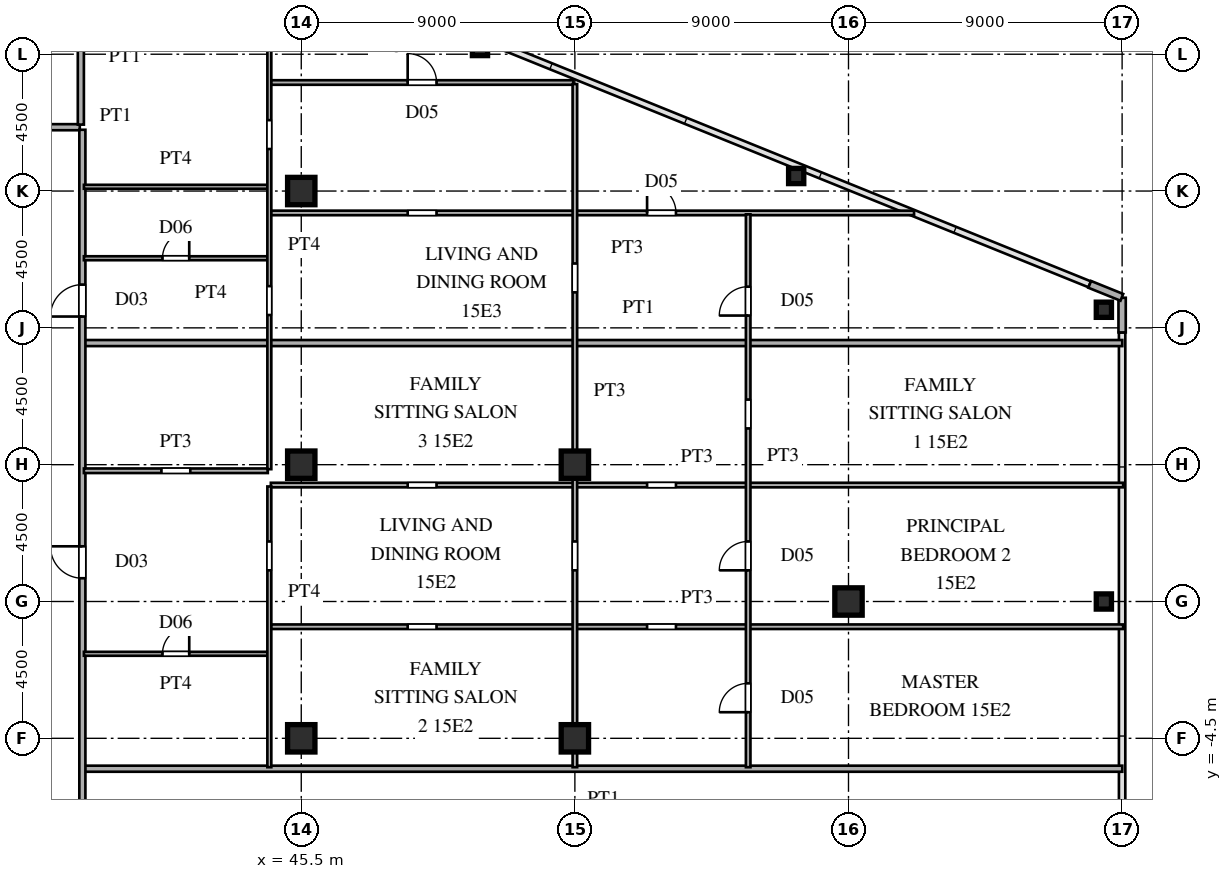
"""IFC4 building model, lengths in metres.
Left out: names, types, materials, properties, quantities, classifications, styles, units other than length and angle.
Written with IfcOpenShell. Run it as: python <this file> out.ifc"""

import sys

from ifc_helpers import new_model, si_unit, direction, frame, frame_2d, origin, origin_2d, place, context, subcontext, project, spatial, rectangle, hollow_rectangle, i_section, extrude, source, transform, mapped, element, fill, save


model = new_model("IFC4")
c1 = context("Model", 3, precision=1e-05, world=origin(), true_north=direction((0.0, 1.0)))
c2 = subcontext(c1, "Body", "Model", "MODEL_VIEW")
j1 = project(units=[si_unit("LENGTHUNIT", "METRE"), si_unit("PLANEANGLEUNIT", "RADIAN")], contexts=[c1])
p1 = place(None, origin())
s1 = spatial("IfcSite", under=j1, at=p1, CompositionType="ELEMENT")
p2 = place(p1, origin())
s2 = spatial("IfcBuilding", under=s1, at=p2, CompositionType="ELEMENT")
p3 = place(p2, frame((0.0, 0.0, 58.5)))
s3 = spatial("IfcBuildingStorey", under=s2, at=p3, CompositionType="ELEMENT", Elevation=58.5)
m1 = source(origin(), c2, "Body", "SweptSolid", [
    extrude(i_section(OverallWidth=0.9, OverallDepth=0.9, WebThickness=0.036, FlangeThickness=0.055, at=origin_2d()), origin(), (0.0, 0.0, 1.0), 3.6),
])
for number, where, z_axis, x_axis in (
    (1, (45.5, -4.5, 0.0), (0.0, 0.0, 1.0), (1.0, 0.0, 0.0)),
    (2, (45.5, 4.5, 0.0), (0.0, 0.0, 1.0), (1.0, 0.0, 0.0)),
    (3, (45.5, 13.5, 0.0), (0.0, 0.0, 1.0), (1.0, 0.0, 0.0)),
    (4, (54.5, -4.5, 0.0), (0.0, 0.0, 1.0), (1.0, 0.0, 0.0)),
    (5, (54.5, 4.5, 0.0), (0.0, 0.0, 1.0), (1.0, 0.0, 0.0)),
    (6, (63.5, 0.0, 0.0), (0.0, 0.0, 1.0), (1.0, 0.0, 0.0)),
):
    element("IfcColumn", number, at=place(p3, frame(where, z_axis=z_axis, x_axis=x_axis)), inside=s3, PredefinedType="COLUMN", context=c2, shape_type="MappedRepresentation", body=[
        mapped(m1, transform((0.0, 0.0, 0.0), scale=1.0)),
    ])
m2 = source(origin(), c2, "Body", "SweptSolid", [
    extrude(hollow_rectangle(XDim=0.5, YDim=0.5, WallThickness=0.02, at=origin_2d()), origin(), (0.0, 0.0, 1.0), 3.6),
])
for number, where, z_axis, x_axis in (
    (7, (71.9, 9.596, 0.0), (0.0, 0.0, 1.0), (1.0, 0.0, 0.0)),
    (8, (51.378, 18.204, 0.0), (0.0, 0.0, 1.0), (1.0, 0.0, 0.0)),
    (9, (61.779, 13.994, 0.0), (0.0, 0.0, 1.0), (1.0, 0.0, 0.0)),
    (10, (71.9, 0.0, 0.0), (0.0, 0.0, 1.0), (1.0, 0.0, 0.0)),
):
    element("IfcColumn", number, at=place(p3, frame(where, z_axis=z_axis, x_axis=x_axis)), inside=s3, PredefinedType="COLUMN", context=c2, shape_type="MappedRepresentation", body=[
        mapped(m2, transform((0.0, 0.0, 0.0), scale=1.0)),
    ])
for number, where, z_axis, x_axis in (
    (11, (72.5, 8.85, 0.0), (0.0, 0.0, 1.0), (0.0, 1.0, 0.0)),
    (12, (72.491, 10.004, 0.0), (0.0, 0.0, 1.0), (-0.927, 0.375, 0.0)),
):
    element("IfcWall", number, at=place(p3, frame(where, z_axis=z_axis, x_axis=x_axis)), inside=s3, PredefinedType="SOLIDWALL", context=c2, shape_type="SweptSolid", body=[
        extrude(rectangle(XDim=1.14, YDim=0.24, at=frame_2d((0.57, 0.0))), origin(), (0.0, 0.0, 1.0), 3.38),
    ])
p4 = place(p3, frame((38.38, -5.5, 0.0), z_axis=(0.0, 0.0, 1.0), x_axis=(1.0, 0.0, 0.0)))
e13 = element("IfcWall", 13, at=p4, inside=s3, PredefinedType="PARTITIONING", context=c2, shape_type="SweptSolid", body=[
    extrude(rectangle(XDim=34.125, YDim=0.2, at=frame_2d((17.062, 0.0))), origin(), (0.0, 0.0, 1.0), 3.38),
])
p5 = place(p3, frame((38.35, -1.72, 0.0), z_axis=(0.0, 0.0, 1.0), x_axis=(1.0, 0.0, 0.0)))
e14 = element("IfcWall", 14, at=p5, inside=s3, PredefinedType="PARTITIONING", context=c2, shape_type="SweptSolid", body=[
    extrude(rectangle(XDim=6.05, YDim=0.13, at=frame_2d((3.025, 0.0))), origin(), (0.0, 0.0, 1.0), 3.38),
])
p6 = place(p5, frame((2.585, 0.0, 0.0)))
e15 = element("IfcOpeningElement", 15, at=p6, cuts=e14, PredefinedType="OPENING", context=c2, shape_type="SweptSolid", body=[
    extrude(rectangle(XDim=0.88, YDim=2.1, at=frame_2d((0.44, 1.05))), frame((0.0, 0.075, 0.0), z_axis=(0.0, -1.0, 0.0), x_axis=(1.0, 0.0, 0.0)), (0.0, 0.0, 1.0), 0.15),
])
p7 = place(p3, frame((44.5, -0.83, 0.0), z_axis=(0.0, 0.0, 1.0), x_axis=(1.0, 0.0, 0.0)))
e16 = element("IfcWall", 16, at=p7, inside=s3, PredefinedType="PARTITIONING", context=c2, shape_type="SweptSolid", body=[
    extrude(rectangle(XDim=28.035, YDim=0.15, at=frame_2d((14.018, 0.0))), origin(), (0.0, 0.0, 1.0), 3.38),
])
p8 = place(p7, frame((4.5, 0.0, 0.0)))
e17 = element("IfcOpeningElement", 17, at=p8, cuts=e16, PredefinedType="OPENING", context=c2, shape_type="SweptSolid", body=[
    extrude(rectangle(XDim=0.95, YDim=2.15, at=frame_2d((0.475, 1.075))), frame((0.0, 0.085, 0.0), z_axis=(0.0, -1.0, 0.0), x_axis=(1.0, 0.0, 0.0)), (0.0, 0.0, 1.0), 0.17),
])
p9 = place(p7, frame((12.375, 0.0, 0.0)))
e18 = element("IfcOpeningElement", 18, at=p9, cuts=e16, PredefinedType="OPENING", context=c2, shape_type="SweptSolid", body=[
    extrude(rectangle(XDim=0.95, YDim=2.15, at=frame_2d((0.475, 1.075))), frame((0.0, 0.085, 0.0), z_axis=(0.0, -1.0, 0.0), x_axis=(1.0, 0.0, 0.0)), (0.0, 0.0, 1.0), 0.17),
])
p10 = place(p3, frame((44.5, 3.83, 0.0), z_axis=(0.0, 0.0, 1.0), x_axis=(1.0, 0.0, 0.0)))
e19 = element("IfcWall", 19, at=p10, inside=s3, PredefinedType="PARTITIONING", context=c2, shape_type="SweptSolid", body=[
    extrude(rectangle(XDim=28.035, YDim=0.15, at=frame_2d((14.018, 0.0))), origin(), (0.0, 0.0, 1.0), 3.38),
])
p11 = place(p10, frame((4.5, 0.0, 0.0)))
e20 = element("IfcOpeningElement", 20, at=p11, cuts=e19, PredefinedType="OPENING", context=c2, shape_type="SweptSolid", body=[
    extrude(rectangle(XDim=0.95, YDim=2.15, at=frame_2d((0.475, 1.075))), frame((0.0, 0.085, 0.0), z_axis=(0.0, -1.0, 0.0), x_axis=(1.0, 0.0, 0.0)), (0.0, 0.0, 1.0), 0.17),
])
p12 = place(p10, frame((12.375, 0.0, 0.0)))
e21 = element("IfcOpeningElement", 21, at=p12, cuts=e19, PredefinedType="OPENING", context=c2, shape_type="SweptSolid", body=[
    extrude(rectangle(XDim=0.95, YDim=2.15, at=frame_2d((0.475, 1.075))), frame((0.0, 0.085, 0.0), z_axis=(0.0, -1.0, 0.0), x_axis=(1.0, 0.0, 0.0)), (0.0, 0.0, 1.0), 0.17),
])
p13 = place(p3, frame((38.35, 4.3, 0.0), z_axis=(0.0, 0.0, 1.0), x_axis=(1.0, 0.0, 0.0)))
e22 = element("IfcWall", 22, at=p13, inside=s3, PredefinedType="PARTITIONING", context=c2, shape_type="SweptSolid", body=[
    extrude(rectangle(XDim=6.05, YDim=0.15, at=frame_2d((3.025, 0.0))), origin(), (0.0, 0.0, 1.0), 3.38),
])
p14 = place(p13, frame((2.55, 0.0, 0.0)))
e23 = element("IfcOpeningElement", 23, at=p14, cuts=e22, PredefinedType="OPENING", context=c2, shape_type="SweptSolid", body=[
    extrude(rectangle(XDim=0.95, YDim=2.15, at=frame_2d((0.475, 1.075))), frame((0.0, 0.085, 0.0), z_axis=(0.0, -1.0, 0.0), x_axis=(1.0, 0.0, 0.0)), (0.0, 0.0, 1.0), 0.17),
])
p15 = place(p3, frame((38.38, 8.5, 0.0), z_axis=(0.0, 0.0, 1.0), x_axis=(1.0, 0.0, 0.0)))
e24 = element("IfcWall", 24, at=p15, inside=s3, PredefinedType="PARTITIONING", context=c2, shape_type="SweptSolid", body=[
    extrude(rectangle(XDim=34.125, YDim=0.2, at=frame_2d((17.062, 0.0))), origin(), (0.0, 0.0, 1.0), 3.38),
])
p16 = place(p3, frame((38.35, 11.29, 0.0), z_axis=(0.0, 0.0, 1.0), x_axis=(1.0, 0.0, 0.0)))
e25 = element("IfcWall", 25, at=p16, inside=s3, PredefinedType="PARTITIONING", context=c2, shape_type="SweptSolid", body=[
    extrude(rectangle(XDim=6.05, YDim=0.13, at=frame_2d((3.025, 0.0))), origin(), (0.0, 0.0, 1.0), 3.38),
])
p17 = place(p16, frame((2.585, 0.0, 0.0)))
e26 = element("IfcOpeningElement", 26, at=p17, cuts=e25, PredefinedType="OPENING", context=c2, shape_type="SweptSolid", body=[
    extrude(rectangle(XDim=0.88, YDim=2.1, at=frame_2d((0.44, 1.05))), frame((0.0, 0.075, 0.0), z_axis=(0.0, -1.0, 0.0), x_axis=(1.0, 0.0, 0.0)), (0.0, 0.0, 1.0), 0.15),
])
p18 = place(p3, frame((44.5, 12.78, 0.0), z_axis=(0.0, 0.0, 1.0), x_axis=(1.0, 0.0, 0.0)))
e27 = element("IfcWall", 27, at=p18, inside=s3, PredefinedType="PARTITIONING", context=c2, shape_type="SweptSolid", body=[
    extrude(rectangle(XDim=21.156, YDim=0.15, at=frame_2d((10.578, 0.0))), origin(), (0.0, 0.0, 1.0), 3.38),
])
p19 = place(p18, frame((4.5, 0.0, 0.0)))
e28 = element("IfcOpeningElement", 28, at=p19, cuts=e27, PredefinedType="OPENING", context=c2, shape_type="SweptSolid", body=[
    extrude(rectangle(XDim=0.95, YDim=2.15, at=frame_2d((0.475, 1.075))), frame((0.0, 0.085, 0.0), z_axis=(0.0, -1.0, 0.0), x_axis=(1.0, 0.0, 0.0)), (0.0, 0.0, 1.0), 0.17),
])
p20 = place(p18, frame((12.375, 0.0, 0.0)))
e29 = element("IfcOpeningElement", 29, at=p20, cuts=e27, PredefinedType="OPENING", context=c2, shape_type="SweptSolid", body=[
    extrude(rectangle(XDim=0.95, YDim=2.15, at=frame_2d((0.475, 1.075))), frame((0.0, 0.085, 0.0), z_axis=(0.0, -1.0, 0.0), x_axis=(1.0, 0.0, 0.0)), (0.0, 0.0, 1.0), 0.17),
])
p21 = place(p3, frame((38.35, 13.64, 0.0), z_axis=(0.0, 0.0, 1.0), x_axis=(1.0, 0.0, 0.0)))
e30 = element("IfcWall", 30, at=p21, inside=s3, PredefinedType="PARTITIONING", context=c2, shape_type="SweptSolid", body=[
    extrude(rectangle(XDim=6.05, YDim=0.13, at=frame_2d((3.025, 0.0))), origin(), (0.0, 0.0, 1.0), 2.68),
])
p22 = place(p3, frame((36.585, 15.6, 0.0), z_axis=(0.0, 0.0, 1.0), x_axis=(1.0, 0.0, 0.0)))
e31 = element("IfcWall", 31, at=p22, inside=s3, PredefinedType="PARTITIONING", context=c2, shape_type="SweptSolid", body=[
    extrude(rectangle(XDim=1.63, YDim=0.2, at=frame_2d((0.815, 0.0))), origin(), (0.0, 0.0, 1.0), 3.38),
])
p23 = place(p3, frame((44.5, 17.07, 0.0), z_axis=(0.0, 0.0, 1.0), x_axis=(1.0, 0.0, 0.0)))
e32 = element("IfcWall", 32, at=p23, inside=s3, PredefinedType="PARTITIONING", context=c2, shape_type="SweptSolid", body=[
    extrude(rectangle(XDim=9.95, YDim=0.15, at=frame_2d((4.975, 0.0))), origin(), (0.0, 0.0, 1.0), 3.38),
])
p24 = place(p23, frame((4.5, 0.0, 0.0)))
e33 = element("IfcOpeningElement", 33, at=p24, cuts=e32, PredefinedType="OPENING", context=c2, shape_type="SweptSolid", body=[
    extrude(rectangle(XDim=0.95, YDim=2.15, at=frame_2d((0.475, 1.075))), frame((0.0, 0.085, 0.0), z_axis=(0.0, -1.0, 0.0), x_axis=(1.0, 0.0, 0.0)), (0.0, 0.0, 1.0), 0.17),
])
p25 = place(p3, frame((38.25, 15.685, 0.0), z_axis=(0.0, 0.0, 1.0), x_axis=(0.0, 1.0, 0.0)))
e34 = element("IfcWall", 34, at=p25, inside=s3, PredefinedType="PARTITIONING", context=c2, shape_type="SweptSolid", body=[
    extrude(rectangle(XDim=2.83, YDim=0.2, at=frame_2d((1.415, 0.0))), origin(), (0.0, 0.0, 1.0), 3.38),
])
p26 = place(p3, frame((38.3, -15.515, 0.0), z_axis=(0.0, 0.0, 1.0), x_axis=(0.0, 1.0, 0.0)))
e35 = element("IfcWall", 35, at=p26, inside=s3, PredefinedType="PARTITIONING", context=c2, shape_type="SweptSolid", body=[
    extrude(rectangle(XDim=31.03, YDim=0.2, at=frame_2d((15.515, 0.0))), origin(), (0.0, 0.0, 1.0), 3.38),
])
p27 = place(p26, frame((4.44, 0.0, 0.0)))
e36 = element("IfcOpeningElement", 36, at=p27, cuts=e35, PredefinedType="OPENING", context=c2, shape_type="SweptSolid", body=[
    extrude(rectangle(XDim=1.05, YDim=2.25, at=frame_2d((0.525, 1.125))), frame((0.0, 0.11, 0.0), z_axis=(0.0, -1.0, 0.0), x_axis=(1.0, 0.0, 0.0)), (0.0, 0.0, 1.0), 0.22),
])
p28 = place(p26, frame((16.28, 0.0, 0.0)))
e37 = element("IfcOpeningElement", 37, at=p28, cuts=e35, PredefinedType="OPENING", context=c2, shape_type="SweptSolid", body=[
    extrude(rectangle(XDim=1.05, YDim=2.25, at=frame_2d((0.525, 1.125))), frame((0.0, 0.11, 0.0), z_axis=(0.0, -1.0, 0.0), x_axis=(1.0, 0.0, 0.0)), (0.0, 0.0, 1.0), 0.22),
])
p29 = place(p26, frame((24.887, 0.0, 0.0)))
e38 = element("IfcOpeningElement", 38, at=p29, cuts=e35, PredefinedType="OPENING", context=c2, shape_type="SweptSolid", body=[
    extrude(rectangle(XDim=1.05, YDim=2.25, at=frame_2d((0.525, 1.125))), frame((0.0, 0.11, 0.0), z_axis=(0.0, -1.0, 0.0), x_axis=(1.0, 0.0, 0.0)), (0.0, 0.0, 1.0), 0.22),
])
p30 = place(p3, frame((44.45, -5.45, 0.0), z_axis=(0.0, 0.0, 1.0), x_axis=(0.0, 1.0, 0.0)))
e39 = element("IfcWall", 39, at=p30, inside=s3, PredefinedType="PARTITIONING", context=c2, shape_type="SweptSolid", body=[
    extrude(rectangle(XDim=9.233, YDim=0.13, at=frame_2d((4.616, 0.0))), origin(), (0.0, 0.0, 1.0), 3.38),
])
p31 = place(p30, frame((6.475, 0.0, 0.0)))
e40 = element("IfcOpeningElement", 40, at=p31, cuts=e39, PredefinedType="OPENING", context=c2, shape_type="SweptSolid", body=[
    extrude(rectangle(XDim=0.95, YDim=2.15, at=frame_2d((0.475, 1.075))), frame((0.0, 0.075, 0.0), z_axis=(0.0, -1.0, 0.0), x_axis=(1.0, 0.0, 0.0)), (0.0, 0.0, 1.0), 0.15),
])
p32 = place(p3, frame((44.45, 4.352, 0.0), z_axis=(0.0, 0.0, 1.0), x_axis=(0.0, 1.0, 0.0)))
e41 = element("IfcWall", 41, at=p32, inside=s3, PredefinedType="PARTITIONING", context=c2, shape_type="SweptSolid", body=[
    extrude(rectangle(XDim=17.037, YDim=0.13, at=frame_2d((8.519, 0.0))), origin(), (0.0, 0.0, 1.0), 3.38),
])
p33 = place(p32, frame((5.071, 0.0, 0.0)))
e42 = element("IfcOpeningElement", 42, at=p33, cuts=e41, PredefinedType="OPENING", context=c2, shape_type="SweptSolid", body=[
    extrude(rectangle(XDim=0.95, YDim=2.15, at=frame_2d((0.475, 1.075))), frame((0.0, 0.075, 0.0), z_axis=(0.0, -1.0, 0.0), x_axis=(1.0, 0.0, 0.0)), (0.0, 0.0, 1.0), 0.15),
])
p34 = place(p32, frame((10.53, 0.0, 0.0)))
e43 = element("IfcOpeningElement", 43, at=p34, cuts=e41, PredefinedType="OPENING", context=c2, shape_type="SweptSolid", body=[
    extrude(rectangle(XDim=0.95, YDim=2.15, at=frame_2d((0.475, 1.075))), frame((0.0, 0.075, 0.0), z_axis=(0.0, -1.0, 0.0), x_axis=(1.0, 0.0, 0.0)), (0.0, 0.0, 1.0), 0.15),
])
p35 = place(p32, frame((15.182, 0.0, 0.0)))
e44 = element("IfcOpeningElement", 44, at=p35, cuts=e41, PredefinedType="OPENING", context=c2, shape_type="SweptSolid", body=[
    extrude(rectangle(XDim=0.95, YDim=2.15, at=frame_2d((0.475, 1.075))), frame((0.0, 0.075, 0.0), z_axis=(0.0, -1.0, 0.0), x_axis=(1.0, 0.0, 0.0)), (0.0, 0.0, 1.0), 0.15),
])
p36 = place(p3, frame((54.5, -5.45, 0.0), z_axis=(0.0, 0.0, 1.0), x_axis=(0.0, 1.0, 0.0)))
e45 = element("IfcWall", 45, at=p36, inside=s3, PredefinedType="PARTITIONING", context=c2, shape_type="SweptSolid", body=[
    extrude(rectangle(XDim=22.469, YDim=0.15, at=frame_2d((11.234, 0.0))), origin(), (0.0, 0.0, 1.0), 2.68),
])
p37 = place(p36, frame((6.475, 0.0, 0.0)))
e46 = element("IfcOpeningElement", 46, at=p37, cuts=e45, PredefinedType="OPENING", context=c2, shape_type="SweptSolid", body=[
    extrude(rectangle(XDim=0.95, YDim=2.15, at=frame_2d((0.475, 1.075))), frame((0.0, 0.085, 0.0), z_axis=(0.0, -1.0, 0.0), x_axis=(1.0, 0.0, 0.0)), (0.0, 0.0, 1.0), 0.17),
])
p38 = place(p36, frame((15.617, 0.0, 0.0)))
e47 = element("IfcOpeningElement", 47, at=p38, cuts=e45, PredefinedType="OPENING", context=c2, shape_type="SweptSolid", body=[
    extrude(rectangle(XDim=0.95, YDim=2.15, at=frame_2d((0.475, 1.075))), frame((0.0, 0.085, 0.0), z_axis=(0.0, -1.0, 0.0), x_axis=(1.0, 0.0, 0.0)), (0.0, 0.0, 1.0), 0.17),
])
p39 = place(p3, frame((60.2, -5.45, 0.0), z_axis=(0.0, 0.0, 1.0), x_axis=(0.0, 1.0, 0.0)))
e48 = element("IfcWall", 48, at=p39, inside=s3, PredefinedType="PARTITIONING", context=c2, shape_type="SweptSolid", body=[
    extrude(rectangle(XDim=18.184, YDim=0.15, at=frame_2d((9.092, 0.0))), origin(), (0.0, 0.0, 1.0), 3.38),
])
p40 = place(p39, frame((1.808, 0.0, 0.0)))
e49 = element("IfcOpeningElement", 49, at=p40, cuts=e48, PredefinedType="OPENING", context=c2, shape_type="SweptSolid", body=[
    extrude(rectangle(XDim=0.95, YDim=2.15, at=frame_2d((0.475, 1.075))), frame((0.0, 0.085, 0.0), z_axis=(0.0, -1.0, 0.0), x_axis=(1.0, 0.0, 0.0)), (0.0, 0.0, 1.0), 0.17),
])
p41 = place(p39, frame((6.475, 0.0, 0.0)))
e50 = element("IfcOpeningElement", 50, at=p41, cuts=e48, PredefinedType="OPENING", context=c2, shape_type="SweptSolid", body=[
    extrude(rectangle(XDim=0.95, YDim=2.15, at=frame_2d((0.475, 1.075))), frame((0.0, 0.085, 0.0), z_axis=(0.0, -1.0, 0.0), x_axis=(1.0, 0.0, 0.0)), (0.0, 0.0, 1.0), 0.17),
])
p42 = place(p39, frame((11.142, 0.0, 0.0)))
e51 = element("IfcOpeningElement", 51, at=p42, cuts=e48, PredefinedType="OPENING", context=c2, shape_type="SweptSolid", body=[
    extrude(rectangle(XDim=0.95, YDim=2.15, at=frame_2d((0.475, 1.075))), frame((0.0, 0.085, 0.0), z_axis=(0.0, -1.0, 0.0), x_axis=(1.0, 0.0, 0.0)), (0.0, 0.0, 1.0), 0.17),
])
p43 = place(p39, frame((14.855, 0.0, 0.0)))
e52 = element("IfcOpeningElement", 52, at=p43, cuts=e48, PredefinedType="OPENING", context=c2, shape_type="SweptSolid", body=[
    extrude(rectangle(XDim=0.95, YDim=2.15, at=frame_2d((0.475, 1.075))), frame((0.0, 0.085, 0.0), z_axis=(0.0, -1.0, 0.0), x_axis=(1.0, 0.0, 0.0)), (0.0, 0.0, 1.0), 0.17),
])
m3 = source(origin(), c2, "Body", "SweptSolid", [
    extrude(rectangle(XDim=0.88, YDim=2.1, at=frame_2d((0.44, 1.05))), frame((0.0, 0.025, 0.0), z_axis=(0.0, -1.0, 0.0), x_axis=(1.0, 0.0, 0.0)), (0.0, 0.0, 1.0), 0.05),
])
p44 = place(p6, origin())
e53 = element("IfcDoor", 53, at=p44, inside=s3, OperationType="SINGLE_SWING_RIGHT", PredefinedType="DOOR", context=c2, shape_type="MappedRepresentation", body=[
    mapped(m3, transform((0.0, 0.0, 0.0), scale=1.0)),
])
fill(e15, e53)
p45 = place(p17, origin())
e54 = element("IfcDoor", 54, at=p45, inside=s3, OperationType="SINGLE_SWING_RIGHT", PredefinedType="DOOR", context=c2, shape_type="MappedRepresentation", body=[
    mapped(m3, transform((0.0, 0.0, 0.0), scale=1.0)),
])
fill(e26, e54)
m4 = source(origin(), c2, "Body", "SweptSolid", [
    extrude(rectangle(XDim=0.95, YDim=2.15, at=frame_2d((0.475, 1.075))), frame((0.0, 0.025, 0.0), z_axis=(0.0, -1.0, 0.0), x_axis=(1.0, 0.0, 0.0)), (0.0, 0.0, 1.0), 0.05),
])
p46 = place(p20, origin())
e55 = element("IfcDoor", 55, at=p46, inside=s3, OperationType="SINGLE_SWING_LEFT", PredefinedType="DOOR", context=c2, shape_type="MappedRepresentation", body=[
    mapped(m4, transform((0.0, 0.0, 0.0), scale=1.0)),
])
fill(e29, e55)
p47 = place(p24, origin())
e56 = element("IfcDoor", 56, at=p47, inside=s3, OperationType="SINGLE_SWING_LEFT", PredefinedType="DOOR", context=c2, shape_type="MappedRepresentation", body=[
    mapped(m4, transform((0.0, 0.0, 0.0), scale=1.0)),
])
fill(e33, e56)
m5 = source(origin(), c2, "Body", "SweptSolid", [
    extrude(rectangle(XDim=1.05, YDim=2.25, at=frame_2d((0.525, 1.125))), frame((0.0, 0.025, 0.0), z_axis=(0.0, -1.0, 0.0), x_axis=(1.0, 0.0, 0.0)), (0.0, 0.0, 1.0), 0.05),
])
p48 = place(p28, origin())
e57 = element("IfcDoor", 57, at=p48, inside=s3, OperationType="SINGLE_SWING_RIGHT", PredefinedType="DOOR", context=c2, shape_type="MappedRepresentation", body=[
    mapped(m5, transform((0.0, 0.0, 0.0), scale=1.0)),
])
fill(e37, e57)
p49 = place(p29, origin())
e58 = element("IfcDoor", 58, at=p49, inside=s3, OperationType="SINGLE_SWING_LEFT", PredefinedType="DOOR", context=c2, shape_type="MappedRepresentation", body=[
    mapped(m5, transform((0.0, 0.0, 0.0), scale=1.0)),
])
fill(e38, e58)
p50 = place(p40, origin())
e59 = element("IfcDoor", 59, at=p50, inside=s3, OperationType="SINGLE_SWING_LEFT", PredefinedType="DOOR", context=c2, shape_type="MappedRepresentation", body=[
    mapped(m4, transform((0.0, 0.0, 0.0), scale=1.0)),
])
fill(e49, e59)
p51 = place(p41, origin())
e60 = element("IfcDoor", 60, at=p51, inside=s3, OperationType="SINGLE_SWING_LEFT", PredefinedType="DOOR", context=c2, shape_type="MappedRepresentation", body=[
    mapped(m4, transform((0.0, 0.0, 0.0), scale=1.0)),
])
fill(e50, e60)
p52 = place(p43, origin())
e61 = element("IfcDoor", 61, at=p52, inside=s3, OperationType="SINGLE_SWING_LEFT", PredefinedType="DOOR", context=c2, shape_type="MappedRepresentation", body=[
    mapped(m4, transform((0.0, 0.0, 0.0), scale=1.0)),
])
fill(e52, e61)
save(model, sys.argv[1])
